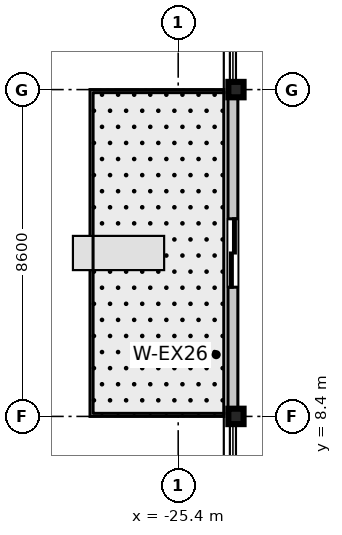
"""IFC4 building model, lengths in metres.
Left out: names, types, materials, properties, quantities, classifications, styles, units other than length and angle.
Written with IfcOpenShell. Run it as: python <this file> out.ifc"""

import sys

from ifc_helpers import new_model, si_unit, direction, frame, frame_2d, origin, origin_2d, place, context, subcontext, project, spatial, rectangle, i_section, extrude, source, transform, mapped, element, fill, save


model = new_model("IFC4")
c1 = context("Model", 3, precision=1e-05, world=origin(), true_north=direction((0.0, 1.0)))
c2 = subcontext(c1, "Body", "Model", "MODEL_VIEW")
j1 = project(units=[si_unit("LENGTHUNIT", "METRE"), si_unit("PLANEANGLEUNIT", "RADIAN")], contexts=[c1])
p1 = place(None, origin())
s1 = spatial("IfcSite", under=j1, at=p1, CompositionType="ELEMENT")
p2 = place(p1, origin())
s2 = spatial("IfcBuilding", under=s1, at=p2, CompositionType="ELEMENT")
p3 = place(p2, frame((0.0, 0.0, 241.9)))
s3 = spatial("IfcBuildingStorey", under=s2, at=p3, CompositionType="ELEMENT", Elevation=241.9)
m1 = source(origin(), c2, "Body", "SweptSolid", [
    extrude(i_section(OverallWidth=0.401, OverallDepth=0.406, WebThickness=0.016, FlangeThickness=0.025, at=origin_2d()), origin(), (0.0, 0.0, 1.0), 3.655),
])
for number, where, z_axis, x_axis in (
    (1, (-23.88, 8.4, 0.0), (0.0, 0.0, 1.0), (1.0, 0.0, 0.0)),
    (2, (-23.88, 17.0, 0.0), (0.0, 0.0, 1.0), (1.0, 0.0, 0.0)),
):
    element("IfcColumn", number, at=place(p3, frame(where, z_axis=z_axis, x_axis=x_axis)), inside=s3, PredefinedType="COLUMN", context=c2, shape_type="MappedRepresentation", body=[
        mapped(m1, transform((0.0, 0.0, 0.0), scale=1.0)),
    ])
m2 = source(origin(), c2, "Body", "SweptSolid", [
    extrude(rectangle(XDim=8.6, YDim=0.26, at=frame_2d((4.3, 0.0))), origin(), (0.0, 0.0, 1.0), 2.89),
])
p4 = place(p3, frame((-23.96, 8.4, 0.0), z_axis=(0.0, 0.0, 1.0), x_axis=(0.0, 1.0, 0.0)))
e3 = element("IfcWall", 3, at=p4, inside=s3, PredefinedType="STANDARD", context=c2, shape_type="MappedRepresentation", body=[
    mapped(m2, transform((0.0, 0.0, 0.0), scale=1.0)),
])
p5 = place(p4, frame((3.4, 0.0, 0.0)))
e4 = element("IfcOpeningElement", 4, at=p5, cuts=e3, PredefinedType="OPENING", context=c2, shape_type="SweptSolid", body=[
    extrude(rectangle(XDim=1.8, YDim=2.25, at=frame_2d((0.9, 1.125))), frame((0.0, 0.14, 0.0), z_axis=(0.0, -1.0, 0.0), x_axis=(1.0, 0.0, 0.0)), (0.0, 0.0, 1.0), 0.28),
])
m3 = source(origin(), c2, "Body", "SweptSolid", [
    extrude(rectangle(XDim=1.8, YDim=2.25, at=frame_2d((0.9, 1.125))), frame((0.0, 0.025, 0.0), z_axis=(0.0, -1.0, 0.0), x_axis=(1.0, 0.0, 0.0)), (0.0, 0.0, 1.0), 0.05),
])
p6 = place(p5, origin())
e5 = element("IfcDoor", 5, at=p6, inside=s3, OperationType="DOUBLE_DOOR_SLIDING", PredefinedType="DOOR", context=c2, shape_type="MappedRepresentation", body=[
    mapped(m3, transform((0.0, 0.0, 0.0), scale=1.0)),
])
fill(e4, e5)
save(model, sys.argv[1])
